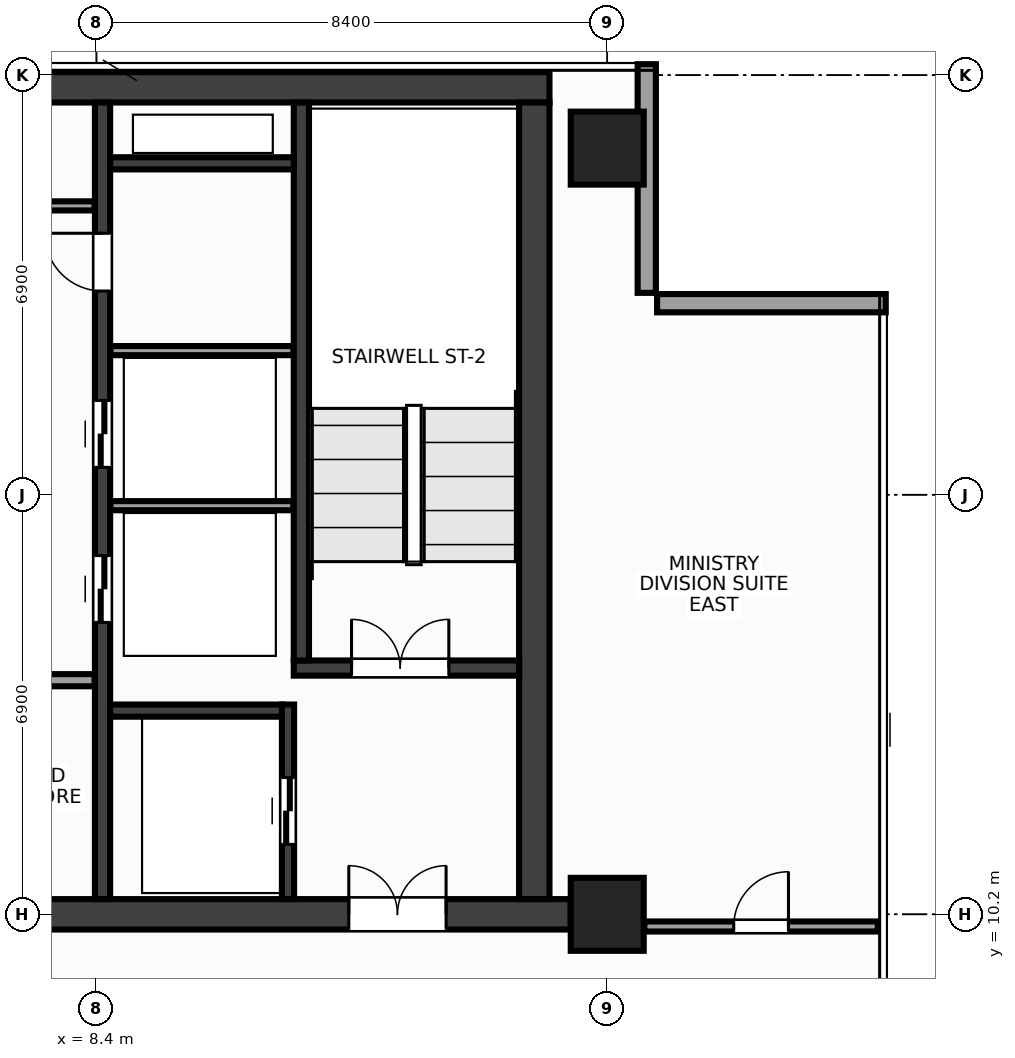
"""IFC4 building model, lengths in metres.
Left out: names, types, materials, properties, quantities, classifications, styles, units other than length and angle.
Written with IfcOpenShell. Run it as: python <this file> out.ifc"""

import sys

from ifc_helpers import new_model, si_unit, direction, frame, frame_2d, origin, origin_2d, place, context, subcontext, project, spatial, rectangle, extrude, source, transform, mapped, element, fill, save


model = new_model("IFC4")
c1 = context("Model", 3, precision=1e-05, world=origin(), true_north=direction((0.0, 1.0)))
c2 = subcontext(c1, "Body", "Model", "MODEL_VIEW")
j1 = project(units=[si_unit("LENGTHUNIT", "METRE"), si_unit("PLANEANGLEUNIT", "RADIAN")], contexts=[c1])
p1 = place(None, origin())
s1 = spatial("IfcSite", under=j1, at=p1, CompositionType="ELEMENT")
p2 = place(p1, origin())
s2 = spatial("IfcBuilding", under=s1, at=p2, CompositionType="ELEMENT")
p3 = place(p2, frame((0.0, 0.0, 286.4)))
s3 = spatial("IfcBuildingStorey", under=s2, at=p3, CompositionType="ELEMENT", Elevation=286.4)
m1 = source(origin(), c2, "Body", "SweptSolid", [
    extrude(rectangle(XDim=31.7, YDim=0.5, at=frame_2d((15.85, 0.0))), origin(), (0.0, 0.0, 1.0), 3.6),
])
p4 = place(p3, frame((-15.85, 23.8, 0.0), z_axis=(0.0, 0.0, 1.0), x_axis=(1.0, 0.0, 0.0)))
e1 = element("IfcWall", 1, at=p4, inside=s3, PredefinedType="SHEAR", context=c2, shape_type="MappedRepresentation", body=[
    mapped(m1, transform((0.0, 0.0, 0.0), x_axis=(1.0, 0.0, 0.0), y_axis=(0.0, 1.0, 0.0), z_axis=(0.0, 0.0, 1.0), scale=1.0)),
])
m2 = source(origin(), c2, "Body", "SweptSolid", [
    extrude(rectangle(XDim=32.4, YDim=0.5, at=frame_2d((16.2, 0.0))), origin(), (0.0, 0.0, 1.0), 3.6),
])
p5 = place(p3, frame((-16.2, 10.2, 0.0), z_axis=(0.0, 0.0, 1.0), x_axis=(1.0, 0.0, 0.0)))
e2 = element("IfcWall", 2, at=p5, inside=s3, PredefinedType="SHEAR", context=c2, shape_type="MappedRepresentation", body=[
    mapped(m2, transform((0.0, 0.0, 0.0), x_axis=(1.0, 0.0, 0.0), y_axis=(0.0, 1.0, 0.0), z_axis=(0.0, 0.0, 1.0), scale=1.0)),
])
p6 = place(p5, frame((2.05, 0.0, 0.0)))
e3 = element("IfcOpeningElement", 3, at=p6, cuts=e2, PredefinedType="OPENING", context=c2, shape_type="SweptSolid", body=[
    extrude(rectangle(XDim=1.6, YDim=2.15, at=frame_2d((0.8, 1.075))), frame((0.0, 0.262, 0.0), z_axis=(0.0, -1.0, 0.0), x_axis=(1.0, 0.0, 0.0)), (0.0, 0.0, 1.0), 0.524),
])
p7 = place(p5, frame((28.75, 0.0, 0.0)))
e4 = element("IfcOpeningElement", 4, at=p7, cuts=e2, PredefinedType="OPENING", context=c2, shape_type="SweptSolid", body=[
    extrude(rectangle(XDim=1.6, YDim=2.15, at=frame_2d((0.8, 1.075))), frame((0.0, 0.262, 0.0), z_axis=(0.0, -1.0, 0.0), x_axis=(1.0, 0.0, 0.0)), (0.0, 0.0, 1.0), 0.524),
])
p8 = place(p5, frame((15.45, 0.0, 0.0)))
e5 = element("IfcOpeningElement", 5, at=p8, cuts=e2, PredefinedType="OPENING", context=c2, shape_type="SweptSolid", body=[
    extrude(rectangle(XDim=1.5, YDim=2.2, at=frame_2d((0.75, 1.1))), frame((0.0, 0.262, 0.0), z_axis=(0.0, -1.0, 0.0), x_axis=(1.0, 0.0, 0.0)), (0.0, 0.0, 1.0), 0.524),
])
m3 = source(origin(), c2, "Body", "SweptSolid", [
    extrude(rectangle(XDim=13.1, YDim=0.5, at=frame_2d((6.55, 0.0))), origin(), (0.0, 0.0, 1.0), 3.6),
])
p9 = place(p3, frame((15.6, 10.45, 0.0), z_axis=(0.0, 0.0, 1.0), x_axis=(0.0, 1.0, 0.0)))
e6 = element("IfcWall", 6, at=p9, inside=s3, PredefinedType="SHEAR", context=c2, shape_type="MappedRepresentation", body=[
    mapped(m3, transform((0.0, 0.0, 0.0), x_axis=(1.0, 0.0, 0.0), y_axis=(0.0, 1.0, 0.0), z_axis=(0.0, 0.0, 1.0), scale=1.0)),
])
m4 = source(origin(), c2, "Body", "SweptSolid", [
    extrude(rectangle(XDim=13.1, YDim=0.25, at=frame_2d((6.55, 0.0))), origin(), (0.0, 0.0, 1.0), 3.6),
])
p10 = place(p3, frame((8.5, 10.45, 0.0), z_axis=(0.0, 0.0, 1.0), x_axis=(0.0, 1.0, 0.0)))
e7 = element("IfcWall", 7, at=p10, inside=s3, PredefinedType="SHEAR", context=c2, shape_type="MappedRepresentation", body=[
    mapped(m4, transform((0.0, 0.0, 0.0), x_axis=(1.0, 0.0, 0.0), y_axis=(0.0, 1.0, 0.0), z_axis=(0.0, 0.0, 1.0), scale=1.0)),
])
p11 = place(p10, frame((4.55, 0.0, 0.0)))
e8 = element("IfcOpeningElement", 8, at=p11, cuts=e7, PredefinedType="OPENING", context=c2, shape_type="SweptSolid", body=[
    extrude(rectangle(XDim=1.1, YDim=2.15, at=frame_2d((0.55, 1.075))), frame((0.0, 0.137, 0.0), z_axis=(0.0, -1.0, 0.0), x_axis=(1.0, 0.0, 0.0)), (0.0, 0.0, 1.0), 0.274),
])
p12 = place(p10, frame((7.1, 0.0, 0.0)))
e9 = element("IfcOpeningElement", 9, at=p12, cuts=e7, PredefinedType="OPENING", context=c2, shape_type="SweptSolid", body=[
    extrude(rectangle(XDim=1.1, YDim=2.15, at=frame_2d((0.55, 1.075))), frame((0.0, 0.137, 0.0), z_axis=(0.0, -1.0, 0.0), x_axis=(1.0, 0.0, 0.0)), (0.0, 0.0, 1.0), 0.274),
])
p13 = place(p10, frame((10.0, 0.0, 0.0)))
e10 = element("IfcOpeningElement", 10, at=p13, cuts=e7, PredefinedType="OPENING", context=c2, shape_type="SweptSolid", body=[
    extrude(rectangle(XDim=0.95, YDim=2.15, at=frame_2d((0.475, 1.075))), frame((0.0, 0.137, 0.0), z_axis=(0.0, -1.0, 0.0), x_axis=(1.0, 0.0, 0.0)), (0.0, 0.0, 1.0), 0.274),
])
m5 = source(origin(), c2, "Body", "SweptSolid", [
    extrude(rectangle(XDim=3.705, YDim=0.25, at=frame_2d((1.853, 0.0))), origin(), (0.0, 0.0, 1.0), 3.6),
])
p14 = place(p3, frame((11.645, 14.25, 0.0), z_axis=(0.0, 0.0, 1.0), x_axis=(1.0, 0.0, 0.0)))
e11 = element("IfcWall", 11, at=p14, inside=s3, PredefinedType="SHEAR", context=c2, shape_type="MappedRepresentation", body=[
    mapped(m5, transform((0.0, 0.0, 0.0), x_axis=(1.0, 0.0, 0.0), y_axis=(0.0, 1.0, 0.0), z_axis=(0.0, 0.0, 1.0), scale=1.0)),
])
p15 = place(p14, frame((0.95, 0.0, 0.0)))
e12 = element("IfcOpeningElement", 12, at=p15, cuts=e11, PredefinedType="OPENING", context=c2, shape_type="SweptSolid", body=[
    extrude(rectangle(XDim=1.6, YDim=2.15, at=frame_2d((0.8, 1.075))), frame((0.0, 0.137, 0.0), z_axis=(0.0, -1.0, 0.0), x_axis=(1.0, 0.0, 0.0)), (0.0, 0.0, 1.0), 0.274),
])
m6 = source(origin(), c2, "Body", "SweptSolid", [
    extrude(rectangle(XDim=9.175, YDim=0.25, at=frame_2d((4.587, 0.0))), origin(), (0.0, 0.0, 1.0), 3.6),
])
p16 = place(p3, frame((11.77, 14.375, 0.0), z_axis=(0.0, 0.0, 1.0), x_axis=(0.0, 1.0, 0.0)))
e13 = element("IfcWall", 13, at=p16, inside=s3, PredefinedType="SHEAR", context=c2, shape_type="MappedRepresentation", body=[
    mapped(m6, transform((0.0, 0.0, 0.0), x_axis=(1.0, 0.0, 0.0), y_axis=(0.0, 1.0, 0.0), z_axis=(0.0, 0.0, 1.0), scale=1.0)),
])
m7 = source(origin(), c2, "Body", "SweptSolid", [
    extrude(rectangle(XDim=3.2, YDim=0.2, at=frame_2d((1.6, 0.0))), origin(), (0.0, 0.0, 1.0), 3.6),
])
p17 = place(p3, frame((11.55, 10.45, 0.0), z_axis=(0.0, 0.0, 1.0), x_axis=(0.0, 1.0, 0.0)))
e14 = element("IfcWall", 14, at=p17, inside=s3, PredefinedType="SHEAR", context=c2, shape_type="MappedRepresentation", body=[
    mapped(m7, transform((0.0, 0.0, 0.0), x_axis=(1.0, 0.0, 0.0), y_axis=(0.0, 1.0, 0.0), z_axis=(0.0, 0.0, 1.0), scale=1.0)),
])
p18 = place(p17, frame((0.9, 0.0, 0.0)))
e15 = element("IfcOpeningElement", 15, at=p18, cuts=e14, PredefinedType="OPENING", context=c2, shape_type="SweptSolid", body=[
    extrude(rectangle(XDim=1.1, YDim=2.15, at=frame_2d((0.55, 1.075))), frame((0.0, 0.112, 0.0), z_axis=(0.0, -1.0, 0.0), x_axis=(1.0, 0.0, 0.0)), (0.0, 0.0, 1.0), 0.224),
])
m8 = source(origin(), c2, "Body", "SweptSolid", [
    extrude(rectangle(XDim=2.825, YDim=0.2, at=frame_2d((1.413, 0.0))), origin(), (0.0, 0.0, 1.0), 3.6),
])
p19 = place(p3, frame((8.625, 13.55, 0.0), z_axis=(0.0, 0.0, 1.0), x_axis=(1.0, 0.0, 0.0)))
e16 = element("IfcWall", 16, at=p19, inside=s3, PredefinedType="SHEAR", context=c2, shape_type="MappedRepresentation", body=[
    mapped(m8, transform((0.0, 0.0, 0.0), x_axis=(1.0, 0.0, 0.0), y_axis=(0.0, 1.0, 0.0), z_axis=(0.0, 0.0, 1.0), scale=1.0)),
])
m9 = source(origin(), c2, "Body", "SweptSolid", [
    extrude(rectangle(XDim=3.02, YDim=0.2, at=frame_2d((1.51, 0.0))), origin(), (0.0, 0.0, 1.0), 3.6),
])
p20 = place(p3, frame((8.625, 22.55, 0.0), z_axis=(0.0, 0.0, 1.0), x_axis=(1.0, 0.0, 0.0)))
e17 = element("IfcWall", 17, at=p20, inside=s3, PredefinedType="SHEAR", context=c2, shape_type="MappedRepresentation", body=[
    mapped(m9, transform((0.0, 0.0, 0.0), x_axis=(1.0, 0.0, 0.0), y_axis=(0.0, 1.0, 0.0), z_axis=(0.0, 0.0, 1.0), scale=1.0)),
])
m10 = source(origin(), c2, "Body", "SweptSolid", [
    extrude(rectangle(XDim=1.2, YDim=1.2, at=origin_2d()), origin(), (0.0, 0.0, 1.0), 3.6),
])
for number, where, z_axis, x_axis in (
    (18, (16.8, 10.2, 0.0), (0.0, 0.0, 1.0), (1.0, 0.0, 0.0)),
    (19, (16.8, 22.8, 0.0), (0.0, 0.0, 1.0), (1.0, 0.0, 0.0)),
):
    element("IfcColumn", number, at=place(p3, frame(where, z_axis=z_axis, x_axis=x_axis)), inside=s3, PredefinedType="COLUMN", context=c2, shape_type="MappedRepresentation", body=[
        mapped(m10, transform((0.0, 0.0, 0.0), x_axis=(1.0, 0.0, 0.0), y_axis=(0.0, 1.0, 0.0), z_axis=(0.0, 0.0, 1.0), scale=1.0)),
    ])
m11 = source(origin(), c2, "Body", "SweptSolid", [
    extrude(rectangle(XDim=3.76, YDim=0.3, at=frame_2d((1.88, 0.0))), origin(), (0.0, 0.0, 1.0), 2.75),
])
p21 = place(p3, frame((21.38, 20.25, 0.0), z_axis=(0.0, 0.0, 1.0), x_axis=(-1.0, 0.0, 0.0)))
e20 = element("IfcWall", 20, at=p21, inside=s3, PredefinedType="STANDARD", context=c2, shape_type="MappedRepresentation", body=[
    mapped(m11, transform((0.0, 0.0, 0.0), x_axis=(1.0, 0.0, 0.0), y_axis=(0.0, 1.0, 0.0), z_axis=(0.0, 0.0, 1.0), scale=1.0)),
])
m12 = source(origin(), c2, "Body", "SweptSolid", [
    extrude(rectangle(XDim=3.76, YDim=0.3, at=frame_2d((1.88, 0.0))), origin(), (0.0, 0.0, 1.0), 2.75),
])
p22 = place(p3, frame((17.45, 20.42, 0.0), z_axis=(0.0, 0.0, 1.0), x_axis=(0.0, 1.0, 0.0)))
e21 = element("IfcWall", 21, at=p22, inside=s3, PredefinedType="STANDARD", context=c2, shape_type="MappedRepresentation", body=[
    mapped(m12, transform((0.0, 0.0, 0.0), x_axis=(1.0, 0.0, 0.0), y_axis=(0.0, 1.0, 0.0), z_axis=(0.0, 0.0, 1.0), scale=1.0)),
])
m13 = source(origin(), c2, "Body", "SweptSolid", [
    extrude(rectangle(XDim=3.01, YDim=0.15, at=frame_2d((1.505, 0.0))), origin(), (0.0, 0.0, 1.0), 3.37),
])
for number, where, z_axis, x_axis in (
    (22, (8.63, 16.92, 0.0), (0.0, 0.0, 1.0), (1.0, 0.0, 0.0)),
    (23, (8.63, 19.47, 0.0), (0.0, 0.0, 1.0), (1.0, 0.0, 0.0)),
):
    element("IfcWall", number, at=place(p3, frame(where, z_axis=z_axis, x_axis=x_axis)), inside=s3, PredefinedType="PARTITIONING", context=c2, shape_type="MappedRepresentation", body=[
        mapped(m13, transform((0.0, 0.0, 0.0), x_axis=(1.0, 0.0, 0.0), y_axis=(0.0, 1.0, 0.0), z_axis=(0.0, 0.0, 1.0), scale=1.0)),
    ])
m14 = source(origin(), c2, "Body", "SweptSolid", [
    extrude(rectangle(XDim=7.07, YDim=0.2, at=frame_2d((3.535, 0.0))), origin(), (0.0, 0.0, 1.0), 3.37),
])
p23 = place(p3, frame((1.3, 14.05, 0.0), z_axis=(0.0, 0.0, 1.0), x_axis=(1.0, 0.0, 0.0)))
e24 = element("IfcWall", 24, at=p23, inside=s3, PredefinedType="PARTITIONING", context=c2, shape_type="MappedRepresentation", body=[
    mapped(m14, transform((0.0, 0.0, 0.0), x_axis=(1.0, 0.0, 0.0), y_axis=(0.0, 1.0, 0.0), z_axis=(0.0, 0.0, 1.0), scale=1.0)),
])
p24 = place(p23, frame((1.71, 0.0, 0.0)))
e25 = element("IfcOpeningElement", 25, at=p24, cuts=e24, PredefinedType="OPENING", context=c2, shape_type="SweptSolid", body=[
    extrude(rectangle(XDim=0.9, YDim=2.15, at=frame_2d((0.45, 1.075))), frame((0.0, 0.112, 0.0), z_axis=(0.0, -1.0, 0.0), x_axis=(1.0, 0.0, 0.0)), (0.0, 0.0, 1.0), 0.224),
])
p25 = place(p23, frame((5.16, 0.0, 0.0)))
e26 = element("IfcOpeningElement", 26, at=p25, cuts=e24, PredefinedType="OPENING", context=c2, shape_type="SweptSolid", body=[
    extrude(rectangle(XDim=0.9, YDim=2.15, at=frame_2d((0.45, 1.075))), frame((0.0, 0.112, 0.0), z_axis=(0.0, -1.0, 0.0), x_axis=(1.0, 0.0, 0.0)), (0.0, 0.0, 1.0), 0.224),
])
m15 = source(origin(), c2, "Body", "SweptSolid", [
    extrude(rectangle(XDim=2.07, YDim=0.15, at=frame_2d((1.035, 0.0))), origin(), (0.0, 0.0, 1.0), 3.37),
])
p26 = place(p3, frame((6.3, 21.85, 0.0), z_axis=(0.0, 0.0, 1.0), x_axis=(1.0, 0.0, 0.0)))
e27 = element("IfcWall", 27, at=p26, inside=s3, PredefinedType="PARTITIONING", context=c2, shape_type="MappedRepresentation", body=[
    mapped(m15, transform((0.0, 0.0, 0.0), x_axis=(1.0, 0.0, 0.0), y_axis=(0.0, 1.0, 0.0), z_axis=(0.0, 0.0, 1.0), scale=1.0)),
])
m16 = source(origin(), c2, "Body", "SweptSolid", [
    extrude(rectangle(XDim=3.84, YDim=0.165, at=frame_2d((1.92, 0.0))), origin(), (0.0, 0.0, 1.0), 2.805),
])
p27 = place(p3, frame((17.41, 10.0, 0.0), z_axis=(0.0, 0.0, 1.0), x_axis=(1.0, 0.0, 0.0)))
e28 = element("IfcWall", 28, at=p27, inside=s3, PredefinedType="PARTITIONING", context=c2, shape_type="MappedRepresentation", body=[
    mapped(m16, transform((0.0, 0.0, 0.0), x_axis=(1.0, 0.0, 0.0), y_axis=(0.0, 1.0, 0.0), z_axis=(0.0, 0.0, 1.0), scale=1.0)),
])
p28 = place(p27, frame((1.47, 0.0, 0.0)))
e29 = element("IfcOpeningElement", 29, at=p28, cuts=e28, PredefinedType="OPENING", context=c2, shape_type="SweptSolid", body=[
    extrude(rectangle(XDim=0.9, YDim=2.15, at=frame_2d((0.45, 1.075))), frame((0.0, 0.094, 0.0), z_axis=(0.0, -1.0, 0.0), x_axis=(1.0, 0.0, 0.0)), (0.0, 0.0, 1.0), 0.189),
])
m17 = source(origin(), c2, "Body", "SweptSolid", [
    extrude(rectangle(XDim=1.6, YDim=2.15, at=frame_2d((0.8, 1.075))), frame((0.0, 0.025, 0.0), z_axis=(0.0, -1.0, 0.0), x_axis=(1.0, 0.0, 0.0)), (0.0, 0.0, 1.0), 0.05),
])
p29 = place(p15, origin())
e30 = element("IfcDoor", 30, at=p29, inside=s3, OperationType="DOUBLE_DOOR_SINGLE_SWING", PredefinedType="DOOR", context=c2, shape_type="MappedRepresentation", body=[
    mapped(m17, transform((0.0, 0.0, 0.0), x_axis=(1.0, 0.0, 0.0), y_axis=(0.0, 1.0, 0.0), z_axis=(0.0, 0.0, 1.0), scale=1.0)),
])
fill(e12, e30)
p30 = place(p7, origin())
e31 = element("IfcDoor", 31, at=p30, inside=s3, OperationType="DOUBLE_DOOR_SINGLE_SWING", PredefinedType="DOOR", context=c2, shape_type="MappedRepresentation", body=[
    mapped(m17, transform((0.0, 0.0, 0.0), x_axis=(1.0, 0.0, 0.0), y_axis=(0.0, 1.0, 0.0), z_axis=(0.0, 0.0, 1.0), scale=1.0)),
])
fill(e4, e31)
m18 = source(origin(), c2, "Body", "SweptSolid", [
    extrude(rectangle(XDim=1.1, YDim=2.15, at=frame_2d((0.55, 1.075))), frame((0.0, 0.025, 0.0), z_axis=(0.0, -1.0, 0.0), x_axis=(1.0, 0.0, 0.0)), (0.0, 0.0, 1.0), 0.05),
])
p31 = place(p18, origin())
e32 = element("IfcDoor", 32, at=p31, inside=s3, OperationType="DOUBLE_DOOR_SLIDING", PredefinedType="DOOR", context=c2, shape_type="MappedRepresentation", body=[
    mapped(m18, transform((0.0, 0.0, 0.0), x_axis=(1.0, 0.0, 0.0), y_axis=(0.0, 1.0, 0.0), z_axis=(0.0, 0.0, 1.0), scale=1.0)),
])
fill(e15, e32)
p32 = place(p11, origin())
e33 = element("IfcDoor", 33, at=p32, inside=s3, OperationType="DOUBLE_DOOR_SLIDING", PredefinedType="DOOR", context=c2, shape_type="MappedRepresentation", body=[
    mapped(m18, transform((0.0, 0.0, 0.0), x_axis=(1.0, 0.0, 0.0), y_axis=(0.0, 1.0, 0.0), z_axis=(0.0, 0.0, 1.0), scale=1.0)),
])
fill(e8, e33)
p33 = place(p12, origin())
e34 = element("IfcDoor", 34, at=p33, inside=s3, OperationType="DOUBLE_DOOR_SLIDING", PredefinedType="DOOR", context=c2, shape_type="MappedRepresentation", body=[
    mapped(m18, transform((0.0, 0.0, 0.0), x_axis=(1.0, 0.0, 0.0), y_axis=(0.0, 1.0, 0.0), z_axis=(0.0, 0.0, 1.0), scale=1.0)),
])
fill(e9, e34)
m19 = source(origin(), c2, "Body", "SweptSolid", [
    extrude(rectangle(XDim=0.95, YDim=2.15, at=frame_2d((0.475, 1.075))), frame((0.0, 0.025, 0.0), z_axis=(0.0, -1.0, 0.0), x_axis=(1.0, 0.0, 0.0)), (0.0, 0.0, 1.0), 0.05),
])
p34 = place(p13, origin())
e35 = element("IfcDoor", 35, at=p34, inside=s3, OperationType="SINGLE_SWING_RIGHT", PredefinedType="DOOR", context=c2, shape_type="MappedRepresentation", body=[
    mapped(m19, transform((0.0, 0.0, 0.0), x_axis=(1.0, 0.0, 0.0), y_axis=(0.0, 1.0, 0.0), z_axis=(0.0, 0.0, 1.0), scale=1.0)),
])
fill(e10, e35)
m20 = source(origin(), c2, "Body", "SweptSolid", [
    extrude(rectangle(XDim=0.9, YDim=2.15, at=frame_2d((0.45, 1.075))), frame((0.0, 0.025, 0.0), z_axis=(0.0, -1.0, 0.0), x_axis=(1.0, 0.0, 0.0)), (0.0, 0.0, 1.0), 0.05),
])
p35 = place(p28, origin())
e36 = element("IfcDoor", 36, at=p35, inside=s3, OperationType="SINGLE_SWING_RIGHT", PredefinedType="DOOR", context=c2, shape_type="MappedRepresentation", body=[
    mapped(m20, transform((0.0, 0.0, 0.0), x_axis=(1.0, 0.0, 0.0), y_axis=(0.0, 1.0, 0.0), z_axis=(0.0, 0.0, 1.0), scale=1.0)),
])
fill(e29, e36)
save(model, sys.argv[1])
